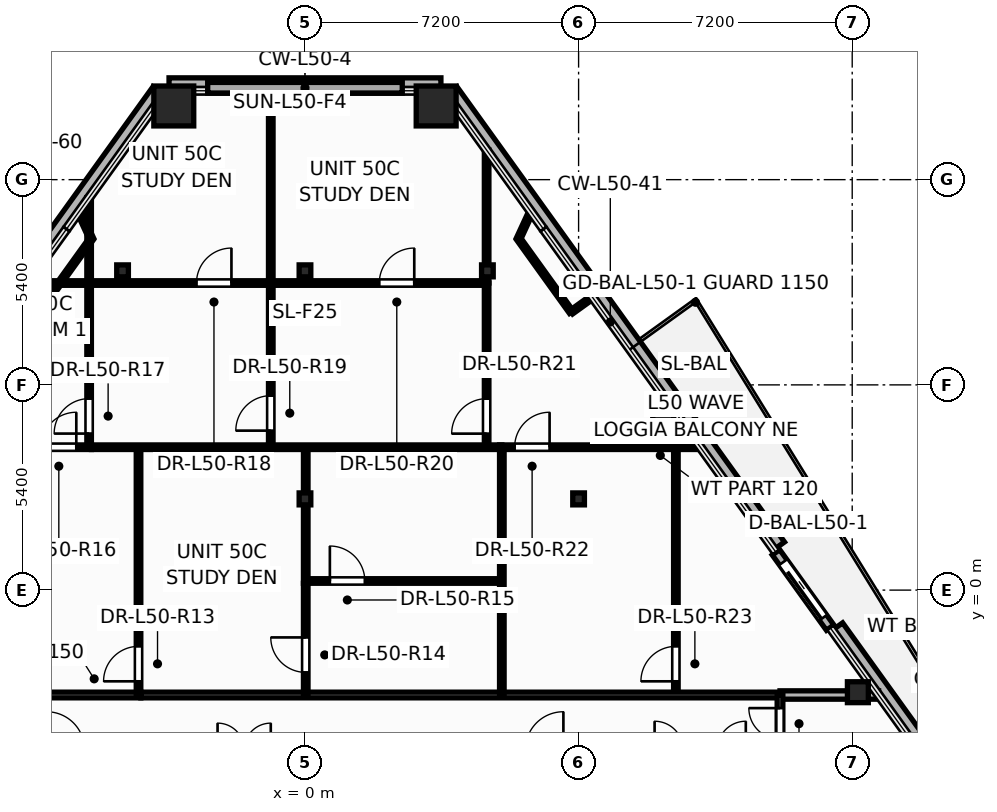
"""IFC4 building model, lengths in metres.
Left out: names, types, materials, properties, quantities, classifications, styles, units other than length and angle.
Written with IfcOpenShell. Run it as: python <this file> out.ifc"""

import sys

from ifc_helpers import new_model, si_unit, direction, frame, frame_2d, origin, origin_2d, place, context, subcontext, project, spatial, rectangle, hollow_rectangle, hollow_circle, i_section, extrude, element, fill, save


model = new_model("IFC4")
c1 = context("Model", 3, precision=1e-05, world=origin(), true_north=direction((0.0, 1.0)))
c2 = subcontext(c1, "Body", "Model", "MODEL_VIEW")
j1 = project(units=[si_unit("LENGTHUNIT", "METRE"), si_unit("PLANEANGLEUNIT", "RADIAN")], contexts=[c1])
p1 = place(None, origin())
s1 = spatial("IfcSite", under=j1, at=p1, CompositionType="ELEMENT")
p2 = place(p1, origin())
s2 = spatial("IfcBuilding", under=s1, at=p2, CompositionType="ELEMENT")
p3 = place(p2, frame((0.0, 0.0, 192.9)))
s3 = spatial("IfcBuildingStorey", under=s2, at=p3, CompositionType="ELEMENT", Elevation=192.9)
for number, where, z_axis, x_axis in (
    (1, (3.452, 12.739, 0.0), (0.0, 0.0, 1.0), (1.0, 0.0, 0.0)),
    (2, (-3.452, 12.739, 0.0), (0.0, 0.0, 1.0), (1.0, 0.0, 0.0)),
):
    element("IfcColumn", number, at=place(p3, frame(where, z_axis=z_axis, x_axis=x_axis)), inside=s3, PredefinedType="COLUMN", context=c2, shape_type="SweptSolid", body=[
        extrude(hollow_rectangle(XDim=1.05, YDim=1.05, WallThickness=0.045, at=origin_2d()), origin(), (0.0, 0.0, 1.0), 3.6),
    ])
for number, where, z_axis, x_axis in (
    (3, (14.549, -2.686, 0.0), (0.0, 0.0, 1.0), (1.0, 0.0, 0.0)),
    (4, (9.427, 4.433, 0.0), (0.0, 0.0, 1.0), (1.0, 0.0, 0.0)),
):
    element("IfcColumn", number, at=place(p3, frame(where, z_axis=z_axis, x_axis=x_axis)), inside=s3, PredefinedType="COLUMN", context=c2, shape_type="SweptSolid", body=[
        extrude(hollow_circle(Radius=0.275, WallThickness=0.024, at=origin_2d()), origin(), (0.0, 0.0, 1.0), 3.6),
    ])
for number, where, z_axis, x_axis in (
    (5, (0.0, 2.4, 0.0), (0.0, 0.0, 1.0), (1.0, 0.0, 0.0)),
    (6, (7.2, 2.4, 0.0), (0.0, 0.0, 1.0), (1.0, 0.0, 0.0)),
    (7, (-4.8, 8.4, 0.0), (0.0, 0.0, 1.0), (1.0, 0.0, 0.0)),
    (8, (0.0, 8.4, 0.0), (0.0, 0.0, 1.0), (1.0, 0.0, 0.0)),
    (9, (4.8, 8.4, 0.0), (0.0, 0.0, 1.0), (1.0, 0.0, 0.0)),
):
    element("IfcColumn", number, at=place(p3, frame(where, z_axis=z_axis, x_axis=x_axis)), inside=s3, PredefinedType="COLUMN", context=c2, shape_type="SweptSolid", body=[
        extrude(i_section(OverallWidth=0.307, OverallDepth=0.314, WebThickness=0.012, FlangeThickness=0.019, at=origin_2d()), origin(), (0.0, 0.0, 1.0), 3.6),
    ])
p4 = place(p3, frame((21.077, -10.801, -0.2), z_axis=(0.0, 0.0, 1.0), x_axis=(-0.583976071479, 0.811770871576, 0.0)))
e10 = element("IfcWall", 10, at=p4, inside=s3, PredefinedType="PARAPET", context=c2, shape_type="SweptSolid", body=[
    extrude(rectangle(XDim=12.115, YDim=0.36, at=frame_2d((6.058, 0.0))), origin(), (0.0, 0.0, 1.0), 0.38),
])
p5 = place(p3, frame((12.472, 1.16, -0.2), z_axis=(0.0, 0.0, 1.0), x_axis=(-0.583990323954, 0.811760618365, 0.0)))
e11 = element("IfcWall", 11, at=p5, inside=s3, PredefinedType="PARAPET", context=c2, shape_type="SweptSolid", body=[
    extrude(rectangle(XDim=14.751, YDim=0.36, at=frame_2d((7.375, 0.0))), origin(), (0.0, 0.0, 1.0), 0.38),
])
p6 = place(p3, frame((3.577, 13.299, -0.2), z_axis=(0.0, 0.0, 1.0), x_axis=(-1.0, 0.0, 0.0)))
e12 = element("IfcWall", 12, at=p6, inside=s3, PredefinedType="PARAPET", context=c2, shape_type="SweptSolid", body=[
    extrude(rectangle(XDim=7.154, YDim=0.36, at=frame_2d((3.577, 0.0))), origin(), (0.0, 0.0, 1.0), 0.38),
])
p7 = place(p3, frame((-3.857, 13.135, -0.2), z_axis=(0.0, 0.0, 1.0), x_axis=(-0.583988536217, -0.811761904481, 0.0)))
e13 = element("IfcWall", 13, at=p7, inside=s3, PredefinedType="PARAPET", context=c2, shape_type="SweptSolid", body=[
    extrude(rectangle(XDim=12.043, YDim=0.36, at=frame_2d((6.022, 0.0))), origin(), (0.0, 0.0, 1.0), 0.38),
])
p8 = place(p3, frame((13.819, -0.987, -0.015), z_axis=(0.0, 0.0, 1.0), x_axis=(-0.583951454754, 0.811788579921, 0.0)))
e14 = element("IfcWall", 14, at=p8, inside=s3, PredefinedType="STANDARD", context=c2, shape_type="SweptSolid", body=[
    extrude(rectangle(XDim=2.44, YDim=0.24, at=frame_2d((1.22, 0.0))), origin(), (0.0, 0.0, 1.0), 2.807),
])
p9 = place(p8, frame((0.32, 0.0, 0.015)))
e15 = element("IfcOpeningElement", 15, at=p9, cuts=e14, PredefinedType="OPENING", context=c2, shape_type="SweptSolid", body=[
    extrude(rectangle(XDim=1.806, YDim=2.204, at=frame_2d((0.9, 1.102))), frame((0.0, 0.13, 0.0), z_axis=(0.0, -1.0, 0.0), x_axis=(1.0, 0.0, 0.0)), (0.0, 0.0, 1.0), 0.26),
])
p10 = place(p3, frame((-12.5, -2.76, 0.0), z_axis=(0.0, 0.0, 1.0), x_axis=(1.0, 0.0, 0.0)))
e16 = element("IfcWall", 16, at=p10, inside=s3, PredefinedType="PARTITIONING", context=c2, shape_type="SweptSolid", body=[
    extrude(rectangle(XDim=8.18, YDim=0.15, at=frame_2d((4.09, 0.0))), origin(), (0.0, 0.0, 1.0), 2.325),
])
p11 = place(p10, frame((1.678, 0.0, 0.0)))
e17 = element("IfcOpeningElement", 17, at=p11, cuts=e16, PredefinedType="OPENING", context=c2, shape_type="SweptSolid", body=[
    extrude(rectangle(XDim=0.956, YDim=2.104, at=frame_2d((0.475, 1.052))), frame((0.0, 0.085, 0.0), z_axis=(0.0, -1.0, 0.0), x_axis=(1.0, 0.0, 0.0)), (0.0, 0.0, 1.0), 0.17),
])
p12 = place(p3, frame((9.76, -2.76, 0.0), z_axis=(0.0, 0.0, 1.0), x_axis=(0.0, 1.0, 0.0)))
e18 = element("IfcWall", 18, at=p12, inside=s3, PredefinedType="PARTITIONING", context=c2, shape_type="SweptSolid", body=[
    extrude(rectangle(XDim=7.416, YDim=0.12, at=frame_2d((3.708, 0.0))), origin(), (0.0, 0.0, 1.0), 2.625),
])
p13 = place(p12, frame((0.36, 0.0, 0.0)))
e19 = element("IfcOpeningElement", 19, at=p13, cuts=e18, PredefinedType="OPENING", context=c2, shape_type="SweptSolid", body=[
    extrude(rectangle(XDim=0.926, YDim=2.104, at=frame_2d((0.46, 1.052))), frame((0.0, 0.07, 0.0), z_axis=(0.0, -1.0, 0.0), x_axis=(1.0, 0.0, 0.0)), (0.0, 0.0, 1.0), 0.14),
])
p14 = place(p3, frame((-5.68, 3.76, 0.0), z_axis=(0.0, 0.0, 1.0), x_axis=(0.0, 1.0, 0.0)))
e20 = element("IfcWall", 20, at=p14, inside=s3, PredefinedType="PARTITIONING", context=c2, shape_type="SweptSolid", body=[
    extrude(rectangle(XDim=6.567, YDim=0.12, at=frame_2d((3.283, 0.0))), origin(), (0.0, 0.0, 1.0), 2.625),
])
p15 = place(p14, frame((0.358, 0.0, 0.0)))
e21 = element("IfcOpeningElement", 21, at=p15, cuts=e20, PredefinedType="OPENING", context=c2, shape_type="SweptSolid", body=[
    extrude(rectangle(XDim=0.926, YDim=2.104, at=frame_2d((0.46, 1.052))), frame((0.0, 0.07, 0.0), z_axis=(0.0, -1.0, 0.0), x_axis=(1.0, 0.0, 0.0)), (0.0, 0.0, 1.0), 0.14),
])
p16 = place(p3, frame((-4.38, -2.76, 0.0), z_axis=(0.0, 0.0, 1.0), x_axis=(0.0, 1.0, 0.0)))
e22 = element("IfcWall", 22, at=p16, inside=s3, PredefinedType="PARTITIONING", context=c2, shape_type="SweptSolid", body=[
    extrude(rectangle(XDim=6.52, YDim=0.12, at=frame_2d((3.26, 0.0))), origin(), (0.0, 0.0, 1.0), 2.325),
])
p17 = place(p16, frame((0.36, 0.0, 0.0)))
e23 = element("IfcOpeningElement", 23, at=p17, cuts=e22, PredefinedType="OPENING", context=c2, shape_type="SweptSolid", body=[
    extrude(rectangle(XDim=0.926, YDim=2.104, at=frame_2d((0.46, 1.052))), frame((0.0, 0.07, 0.0), z_axis=(0.0, -1.0, 0.0), x_axis=(1.0, 0.0, 0.0)), (0.0, 0.0, 1.0), 0.14),
])
p18 = place(p3, frame((-7.296, 8.08, 0.0), z_axis=(0.0, 0.0, 1.0), x_axis=(1.0, 0.0, 0.0)))
e24 = element("IfcWall", 24, at=p18, inside=s3, PredefinedType="PARTITIONING", context=c2, shape_type="SweptSolid", body=[
    extrude(rectangle(XDim=6.396, YDim=0.12, at=frame_2d((3.198, 0.0))), origin(), (0.0, 0.0, 1.0), 2.625),
])
p19 = place(p18, frame((4.441, 0.0, 0.0)))
e25 = element("IfcOpeningElement", 25, at=p19, cuts=e24, PredefinedType="OPENING", context=c2, shape_type="SweptSolid", body=[
    extrude(rectangle(XDim=0.926, YDim=2.104, at=frame_2d((0.46, 1.052))), frame((0.0, 0.07, 0.0), z_axis=(0.0, -1.0, 0.0), x_axis=(1.0, 0.0, 0.0)), (0.0, 0.0, 1.0), 0.14),
])
p20 = place(p3, frame((-0.9, 8.08, 0.0), z_axis=(0.0, 0.0, 1.0), x_axis=(1.0, 0.0, 0.0)))
e26 = element("IfcWall", 26, at=p20, inside=s3, PredefinedType="PARTITIONING", context=c2, shape_type="SweptSolid", body=[
    extrude(rectangle(XDim=5.68, YDim=0.12, at=frame_2d((2.84, 0.0))), origin(), (0.0, 0.0, 1.0), 2.325),
])
p21 = place(p20, frame((2.856, 0.0, 0.0)))
e27 = element("IfcOpeningElement", 27, at=p21, cuts=e26, PredefinedType="OPENING", context=c2, shape_type="SweptSolid", body=[
    extrude(rectangle(XDim=0.926, YDim=2.104, at=frame_2d((0.46, 1.052))), frame((0.0, 0.07, 0.0), z_axis=(0.0, -1.0, 0.0), x_axis=(1.0, 0.0, 0.0)), (0.0, 0.0, 1.0), 0.14),
])
p22 = place(p3, frame((5.12, 3.76, 0.0), z_axis=(0.0, 0.0, 1.0), x_axis=(1.0, 0.0, 0.0)))
e28 = element("IfcWall", 28, at=p22, inside=s3, PredefinedType="PARTITIONING", context=c2, shape_type="SweptSolid", body=[
    extrude(rectangle(XDim=5.284, YDim=0.12, at=frame_2d((2.642, 0.0))), origin(), (0.0, 0.0, 1.0), 2.625),
])
p23 = place(p22, frame((0.397, 0.0, 0.0)))
e29 = element("IfcOpeningElement", 29, at=p23, cuts=e28, PredefinedType="OPENING", context=c2, shape_type="SweptSolid", body=[
    extrude(rectangle(XDim=0.926, YDim=2.104, at=frame_2d((0.46, 1.052))), frame((0.0, 0.07, 0.0), z_axis=(0.0, -1.0, 0.0), x_axis=(1.0, 0.0, 0.0)), (0.0, 0.0, 1.0), 0.14),
])
p24 = place(p3, frame((-4.318, -2.76, 0.0), z_axis=(0.0, 0.0, 1.0), x_axis=(1.0, 0.0, 0.0)))
e30 = element("IfcWall", 30, at=p24, inside=s3, PredefinedType="PARTITIONING", context=c2, shape_type="SweptSolid", body=[
    extrude(rectangle(XDim=16.818, YDim=0.15, at=frame_2d((8.409, 0.0))), origin(), (0.0, 0.0, 1.0), 2.325),
])
p25 = place(p3, frame((0.02, 0.24, 0.0), z_axis=(0.0, 0.0, 1.0), x_axis=(1.0, 0.0, 0.0)))
e31 = element("IfcWall", 31, at=p25, inside=s3, PredefinedType="PARTITIONING", context=c2, shape_type="SweptSolid", body=[
    extrude(rectangle(XDim=5.16, YDim=0.12, at=frame_2d((2.58, 0.0))), origin(), (0.0, 0.0, 1.0), 2.325),
])
p26 = place(p25, frame((0.635, 0.0, 0.0)))
e32 = element("IfcOpeningElement", 32, at=p26, cuts=e31, PredefinedType="OPENING", context=c2, shape_type="SweptSolid", body=[
    extrude(rectangle(XDim=0.926, YDim=2.104, at=frame_2d((0.46, 1.052))), frame((0.0, 0.07, 0.0), z_axis=(0.0, -1.0, 0.0), x_axis=(1.0, 0.0, 0.0)), (0.0, 0.0, 1.0), 0.14),
])
p27 = place(p3, frame((-0.9, 8.08, 0.0), z_axis=(0.0, 0.0, 1.0), x_axis=(0.0, 1.0, 0.0)))
e33 = element("IfcWall", 33, at=p27, inside=s3, PredefinedType="PARTITIONING", context=c2, shape_type="SweptSolid", body=[
    extrude(rectangle(XDim=5.059, YDim=0.12, at=frame_2d((2.529, 0.0))), origin(), (0.0, 0.0, 1.0), 2.625),
])
p28 = place(p3, frame((-0.96, 3.76, 0.0), z_axis=(0.0, 0.0, 1.0), x_axis=(1.0, 0.0, 0.0)))
e34 = element("IfcWall", 34, at=p28, inside=s3, PredefinedType="PARTITIONING", context=c2, shape_type="SweptSolid", body=[
    extrude(rectangle(XDim=6.14, YDim=0.12, at=frame_2d((3.07, 0.0))), origin(), (0.0, 0.0, 1.0), 2.325),
])
p29 = place(p3, frame((-10.404, 3.76, 0.0), z_axis=(0.0, 0.0, 1.0), x_axis=(1.0, 0.0, 0.0)))
e35 = element("IfcWall", 35, at=p29, inside=s3, PredefinedType="PARTITIONING", context=c2, shape_type="SweptSolid", body=[
    extrude(rectangle(XDim=4.784, YDim=0.12, at=frame_2d((2.392, 0.0))), origin(), (0.0, 0.0, 1.0), 2.625),
])
p30 = place(p29, frame((3.467, 0.0, 0.0)))
e36 = element("IfcOpeningElement", 36, at=p30, cuts=e35, PredefinedType="OPENING", context=c2, shape_type="SweptSolid", body=[
    extrude(rectangle(XDim=0.926, YDim=2.104, at=frame_2d((0.46, 1.052))), frame((0.0, 0.07, 0.0), z_axis=(0.0, -1.0, 0.0), x_axis=(1.0, 0.0, 0.0)), (0.0, 0.0, 1.0), 0.14),
])
p31 = place(p3, frame((-0.9, 3.76, 0.0), z_axis=(0.0, 0.0, 1.0), x_axis=(0.0, 1.0, 0.0)))
e37 = element("IfcWall", 37, at=p31, inside=s3, PredefinedType="PARTITIONING", context=c2, shape_type="SweptSolid", body=[
    extrude(rectangle(XDim=4.32, YDim=0.12, at=frame_2d((2.16, 0.0))), origin(), (0.0, 0.0, 1.0), 3.021),
])
p32 = place(p31, frame((0.436, 0.0, 0.0)))
e38 = element("IfcOpeningElement", 38, at=p32, cuts=e37, PredefinedType="OPENING", context=c2, shape_type="SweptSolid", body=[
    extrude(rectangle(XDim=0.926, YDim=2.104, at=frame_2d((0.46, 1.052))), frame((0.0, 0.07, 0.0), z_axis=(0.0, -1.0, 0.0), x_axis=(1.0, 0.0, 0.0)), (0.0, 0.0, 1.0), 0.14),
])
p33 = place(p3, frame((4.78, 3.76, 0.0), z_axis=(0.0, 0.0, 1.0), x_axis=(0.0, 1.0, 0.0)))
e39 = element("IfcWall", 39, at=p33, inside=s3, PredefinedType="PARTITIONING", context=c2, shape_type="SweptSolid", body=[
    extrude(rectangle(XDim=4.32, YDim=0.12, at=frame_2d((2.16, 0.0))), origin(), (0.0, 0.0, 1.0), 2.625),
])
p34 = place(p33, frame((0.357, 0.0, 0.0)))
e40 = element("IfcOpeningElement", 40, at=p34, cuts=e39, PredefinedType="OPENING", context=c2, shape_type="SweptSolid", body=[
    extrude(rectangle(XDim=0.926, YDim=2.104, at=frame_2d((0.46, 1.052))), frame((0.0, 0.07, 0.0), z_axis=(0.0, -1.0, 0.0), x_axis=(1.0, 0.0, 0.0)), (0.0, 0.0, 1.0), 0.14),
])
p35 = place(p3, frame((0.02, 0.18, 0.0), z_axis=(0.0, 0.0, 1.0), x_axis=(0.0, 1.0, 0.0)))
e41 = element("IfcWall", 41, at=p35, inside=s3, PredefinedType="PARTITIONING", context=c2, shape_type="SweptSolid", body=[
    extrude(rectangle(XDim=3.58, YDim=0.12, at=frame_2d((1.79, 0.0))), origin(), (0.0, 0.0, 1.0), 2.325),
])
p36 = place(p3, frame((-5.618, 3.76, 0.0), z_axis=(0.0, 0.0, 1.0), x_axis=(1.0, 0.0, 0.0)))
e42 = element("IfcWall", 42, at=p36, inside=s3, PredefinedType="PARTITIONING", context=c2, shape_type="SweptSolid", body=[
    extrude(rectangle(XDim=4.656, YDim=0.12, at=frame_2d((2.328, 0.0))), origin(), (0.0, 0.0, 1.0), 2.969),
])
p37 = place(p3, frame((5.18, -2.76, 0.0), z_axis=(0.0, 0.0, 1.0), x_axis=(0.0, 1.0, 0.0)))
e43 = element("IfcWall", 43, at=p37, inside=s3, PredefinedType="PARTITIONING", context=c2, shape_type="SweptSolid", body=[
    extrude(rectangle(XDim=6.52, YDim=0.12, at=frame_2d((3.26, 0.0))), origin(), (0.0, 0.0, 1.0), 2.325),
])
p38 = place(p3, frame((4.78, 8.08, 0.0), z_axis=(0.0, 0.0, 1.0), x_axis=(0.0, 1.0, 0.0)))
e44 = element("IfcWall", 44, at=p38, inside=s3, PredefinedType="PARTITIONING", context=c2, shape_type="SweptSolid", body=[
    extrude(rectangle(XDim=3.498, YDim=0.12, at=frame_2d((1.749, 0.0))), origin(), (0.0, 0.0, 1.0), 2.625),
])
p39 = place(p3, frame((0.02, -2.76, 0.0), z_axis=(0.0, 0.0, 1.0), x_axis=(0.0, 1.0, 0.0)))
e45 = element("IfcWall", 45, at=p39, inside=s3, PredefinedType="PARTITIONING", context=c2, shape_type="SweptSolid", body=[
    extrude(rectangle(XDim=2.938, YDim=0.12, at=frame_2d((1.469, 0.0))), origin(), (0.0, 0.0, 1.0), 2.325),
])
p40 = place(p39, frame((0.595, 0.0, 0.0)))
e46 = element("IfcOpeningElement", 46, at=p40, cuts=e45, PredefinedType="OPENING", context=c2, shape_type="SweptSolid", body=[
    extrude(rectangle(XDim=0.926, YDim=2.104, at=frame_2d((0.46, 1.052))), frame((0.0, 0.07, 0.0), z_axis=(0.0, -1.0, 0.0), x_axis=(1.0, 0.0, 0.0)), (0.0, 0.0, 1.0), 0.14),
])
p41 = place(p3, frame((12.5, -2.76, 0.0), z_axis=(0.0, 0.0, 1.0), x_axis=(1.0, 0.0, 0.0)))
e47 = element("IfcWall", 47, at=p41, inside=s3, PredefinedType="PARTITIONING", context=c2, shape_type="SweptSolid", body=[
    extrude(rectangle(XDim=2.595, YDim=0.22, at=frame_2d((1.297, 0.0))), origin(), (0.0, 0.0, 1.0), 2.625),
])
for number, where, z_axis, x_axis in (
    (48, (-5.62, 9.246, 0.0), (0.0, 0.0, 1.0), (-0.584, -0.812, 0.0)),
    (49, (7.009, 7.315, 0.0), (0.0, 0.0, 1.0), (-0.584, 0.812, 0.0)),
):
    element("IfcWall", number, at=place(p3, frame(where, z_axis=z_axis, x_axis=x_axis)), inside=s3, PredefinedType="PARTITIONING", context=c2, shape_type="SweptSolid", body=[
        extrude(rectangle(XDim=2.378, YDim=0.12, at=frame_2d((1.189, 0.0))), origin(), (0.0, 0.0, 1.0), 3.35),
    ])
p42 = place(p3, frame((12.5, -4.24, 0.0), z_axis=(0.0, 0.0, 1.0), x_axis=(0.0, 1.0, 0.0)))
e50 = element("IfcWall", 50, at=p42, inside=s3, PredefinedType="PARTITIONING", context=c2, shape_type="SweptSolid", body=[
    extrude(rectangle(XDim=1.48, YDim=0.15, at=frame_2d((0.74, 0.0))), origin(), (0.0, 0.0, 1.0), 2.325),
])
p43 = place(p42, frame((0.315, 0.0, 0.0)))
e51 = element("IfcOpeningElement", 51, at=p43, cuts=e50, PredefinedType="OPENING", context=c2, shape_type="SweptSolid", body=[
    extrude(rectangle(XDim=0.826, YDim=2.104, at=frame_2d((0.41, 1.052))), frame((0.0, 0.085, 0.0), z_axis=(0.0, -1.0, 0.0), x_axis=(1.0, 0.0, 0.0)), (0.0, 0.0, 1.0), 0.17),
])
for number, where, z_axis, x_axis in (
    (52, (-5.943, 9.945, 0.0), (0.0, 0.0, 1.0), (0.419, -0.908, 0.0)),
    (53, (5.62, 9.246, 0.0), (0.0, 0.0, 1.0), (0.419, 0.908, 0.0)),
):
    element("IfcWall", number, at=place(p3, frame(where, z_axis=z_axis, x_axis=x_axis)), inside=s3, PredefinedType="PARTITIONING", context=c2, shape_type="SweptSolid", body=[
        extrude(rectangle(XDim=0.77, YDim=0.12, at=frame_2d((0.385, 0.0))), origin(), (0.0, 0.0, 1.0), 2.792),
    ])
p44 = place(p3, frame((7.553, 7.706, 0.0), z_axis=(0.0, 0.0, 1.0), x_axis=(-0.811734696256, -0.584026354622, 0.0)))
e54 = element("IfcWall", 54, at=p44, inside=s3, PredefinedType="PARTITIONING", context=c2, shape_type="SweptSolid", body=[
    extrude(rectangle(XDim=0.67, YDim=0.12, at=frame_2d((0.335, 0.0))), origin(), (0.0, 0.0, 1.0), 2.792),
])
p45 = place(p9, origin())
e55 = element("IfcDoor", 55, at=p45, inside=s3, OperationType="SLIDING_TO_LEFT", PredefinedType="DOOR", context=c2, shape_type="SweptSolid", body=[
    extrude(rectangle(XDim=1.8, YDim=2.2, at=frame_2d((0.9, 1.1))), frame((0.0, 0.025, 0.0), z_axis=(0.0, -1.0, 0.0), x_axis=(1.0, 0.0, 0.0)), (0.0, 0.0, 1.0), 0.05),
])
fill(e15, e55)
p46 = place(p43, origin())
e56 = element("IfcDoor", 56, at=p46, inside=s3, OperationType="SINGLE_SWING_RIGHT", PredefinedType="DOOR", context=c2, shape_type="SweptSolid", body=[
    extrude(rectangle(XDim=0.82, YDim=2.1, at=frame_2d((0.41, 1.05))), frame((0.0, 0.025, 0.0), z_axis=(0.0, -1.0, 0.0), x_axis=(1.0, 0.0, 0.0)), (0.0, 0.0, 1.0), 0.05),
])
fill(e51, e56)
p47 = place(p17, origin())
e57 = element("IfcDoor", 57, at=p47, inside=s3, OperationType="SINGLE_SWING_LEFT", PredefinedType="DOOR", context=c2, shape_type="SweptSolid", body=[
    extrude(rectangle(XDim=0.92, YDim=2.1, at=frame_2d((0.46, 1.05))), frame((0.0, 0.025, 0.0), z_axis=(0.0, -1.0, 0.0), x_axis=(1.0, 0.0, 0.0)), (0.0, 0.0, 1.0), 0.05),
])
fill(e23, e57)
p48 = place(p40, origin())
e58 = element("IfcDoor", 58, at=p48, inside=s3, OperationType="SINGLE_SWING_RIGHT", PredefinedType="DOOR", context=c2, shape_type="SweptSolid", body=[
    extrude(rectangle(XDim=0.92, YDim=2.1, at=frame_2d((0.46, 1.05))), frame((0.0, 0.025, 0.0), z_axis=(0.0, -1.0, 0.0), x_axis=(1.0, 0.0, 0.0)), (0.0, 0.0, 1.0), 0.05),
])
fill(e46, e58)
p49 = place(p26, origin())
e59 = element("IfcDoor", 59, at=p49, inside=s3, OperationType="SINGLE_SWING_LEFT", PredefinedType="DOOR", context=c2, shape_type="SweptSolid", body=[
    extrude(rectangle(XDim=0.92, YDim=2.1, at=frame_2d((0.46, 1.05))), frame((0.0, 0.025, 0.0), z_axis=(0.0, -1.0, 0.0), x_axis=(1.0, 0.0, 0.0)), (0.0, 0.0, 1.0), 0.05),
])
fill(e32, e59)
p50 = place(p30, origin())
e60 = element("IfcDoor", 60, at=p50, inside=s3, OperationType="SINGLE_SWING_RIGHT", PredefinedType="DOOR", context=c2, shape_type="SweptSolid", body=[
    extrude(rectangle(XDim=0.92, YDim=2.1, at=frame_2d((0.46, 1.05))), frame((0.0, 0.025, 0.0), z_axis=(0.0, -1.0, 0.0), x_axis=(1.0, 0.0, 0.0)), (0.0, 0.0, 1.0), 0.05),
])
fill(e36, e60)
p51 = place(p15, origin())
e61 = element("IfcDoor", 61, at=p51, inside=s3, OperationType="SINGLE_SWING_LEFT", PredefinedType="DOOR", context=c2, shape_type="SweptSolid", body=[
    extrude(rectangle(XDim=0.92, YDim=2.1, at=frame_2d((0.46, 1.05))), frame((0.0, 0.025, 0.0), z_axis=(0.0, -1.0, 0.0), x_axis=(1.0, 0.0, 0.0)), (0.0, 0.0, 1.0), 0.05),
])
fill(e21, e61)
p52 = place(p19, origin())
e62 = element("IfcDoor", 62, at=p52, inside=s3, OperationType="SINGLE_SWING_RIGHT", PredefinedType="DOOR", context=c2, shape_type="SweptSolid", body=[
    extrude(rectangle(XDim=0.92, YDim=2.1, at=frame_2d((0.46, 1.05))), frame((0.0, 0.025, 0.0), z_axis=(0.0, -1.0, 0.0), x_axis=(1.0, 0.0, 0.0)), (0.0, 0.0, 1.0), 0.05),
])
fill(e25, e62)
p53 = place(p32, origin())
e63 = element("IfcDoor", 63, at=p53, inside=s3, OperationType="SINGLE_SWING_LEFT", PredefinedType="DOOR", context=c2, shape_type="SweptSolid", body=[
    extrude(rectangle(XDim=0.92, YDim=2.1, at=frame_2d((0.46, 1.05))), frame((0.0, 0.025, 0.0), z_axis=(0.0, -1.0, 0.0), x_axis=(1.0, 0.0, 0.0)), (0.0, 0.0, 1.0), 0.05),
])
fill(e38, e63)
p54 = place(p21, origin())
e64 = element("IfcDoor", 64, at=p54, inside=s3, OperationType="SINGLE_SWING_RIGHT", PredefinedType="DOOR", context=c2, shape_type="SweptSolid", body=[
    extrude(rectangle(XDim=0.92, YDim=2.1, at=frame_2d((0.46, 1.05))), frame((0.0, 0.025, 0.0), z_axis=(0.0, -1.0, 0.0), x_axis=(1.0, 0.0, 0.0)), (0.0, 0.0, 1.0), 0.05),
])
fill(e27, e64)
p55 = place(p34, origin())
e65 = element("IfcDoor", 65, at=p55, inside=s3, OperationType="SINGLE_SWING_LEFT", PredefinedType="DOOR", context=c2, shape_type="SweptSolid", body=[
    extrude(rectangle(XDim=0.92, YDim=2.1, at=frame_2d((0.46, 1.05))), frame((0.0, 0.025, 0.0), z_axis=(0.0, -1.0, 0.0), x_axis=(1.0, 0.0, 0.0)), (0.0, 0.0, 1.0), 0.05),
])
fill(e40, e65)
p56 = place(p23, origin())
e66 = element("IfcDoor", 66, at=p56, inside=s3, OperationType="SINGLE_SWING_RIGHT", PredefinedType="DOOR", context=c2, shape_type="SweptSolid", body=[
    extrude(rectangle(XDim=0.92, YDim=2.1, at=frame_2d((0.46, 1.05))), frame((0.0, 0.025, 0.0), z_axis=(0.0, -1.0, 0.0), x_axis=(1.0, 0.0, 0.0)), (0.0, 0.0, 1.0), 0.05),
])
fill(e29, e66)
p57 = place(p13, origin())
e67 = element("IfcDoor", 67, at=p57, inside=s3, OperationType="SINGLE_SWING_LEFT", PredefinedType="DOOR", context=c2, shape_type="SweptSolid", body=[
    extrude(rectangle(XDim=0.92, YDim=2.1, at=frame_2d((0.46, 1.05))), frame((0.0, 0.025, 0.0), z_axis=(0.0, -1.0, 0.0), x_axis=(1.0, 0.0, 0.0)), (0.0, 0.0, 1.0), 0.05),
])
fill(e19, e67)
save(model, sys.argv[1])
